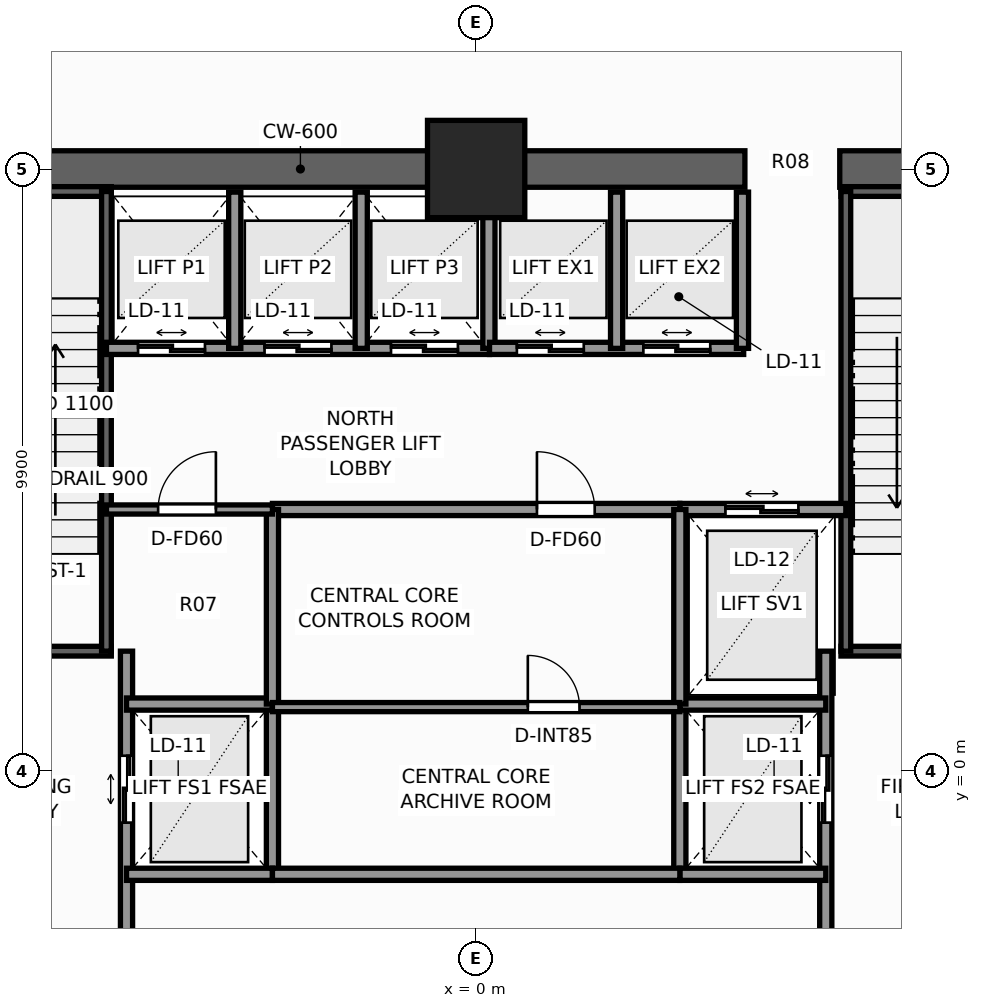
"""IFC4 building model, lengths in metres.
Left out: names, types, materials, properties, quantities, classifications, styles, units other than length and angle.
Written with IfcOpenShell. Run it as: python <this file> out.ifc"""

import sys

from ifc_helpers import new_model, si_unit, direction, frame, frame_2d, origin, origin_2d, place, context, subcontext, project, spatial, rectangle, extrude, element, fill, save


model = new_model("IFC4")
c1 = context("Model", 3, precision=1e-05, world=origin(), true_north=direction((0.0, 1.0)))
c2 = subcontext(c1, "Body", "Model", "MODEL_VIEW")
j1 = project(units=[si_unit("LENGTHUNIT", "METRE"), si_unit("PLANEANGLEUNIT", "RADIAN")], contexts=[c1])
p1 = place(None, origin())
s1 = spatial("IfcSite", under=j1, at=p1, CompositionType="ELEMENT")
p2 = place(p1, origin())
s2 = spatial("IfcBuilding", under=s1, at=p2, CompositionType="ELEMENT")
p3 = place(p2, origin())
s3 = spatial("IfcBuildingStorey", under=s2, at=p3, CompositionType="ELEMENT", Elevation=0.0)
p4 = place(p3, frame((-10.2, 9.9, 0.0), z_axis=(0.0, 0.0, 1.0), x_axis=(1.0, 0.0, 0.0)))
e1 = element("IfcWall", 1, at=p4, inside=s3, PredefinedType="SHEAR", context=c2, shape_type="SweptSolid", body=[
    extrude(rectangle(XDim=14.62, YDim=0.6, at=frame_2d((7.31, 0.0))), origin(), (0.0, 0.0, 1.0), 5.5),
])
p5 = place(p3, frame((5.98, 9.9, 0.0), z_axis=(0.0, 0.0, 1.0), x_axis=(1.0, 0.0, 0.0)))
e2 = element("IfcWall", 2, at=p5, inside=s3, PredefinedType="SHEAR", context=c2, shape_type="SweptSolid", body=[
    extrude(rectangle(XDim=4.22, YDim=0.6, at=frame_2d((2.11, 0.0))), origin(), (0.0, 0.0, 1.0), 5.5),
])
p6 = place(p3, frame((0.0, 9.9, 0.0), z_axis=(0.0, 0.0, 1.0), x_axis=(1.0, 0.0, 0.0)))
e3 = element("IfcColumn", 3, at=p6, inside=s3, PredefinedType="COLUMN", context=c2, shape_type="SweptSolid", body=[
    extrude(rectangle(XDim=1.6, YDim=1.6, at=origin_2d()), origin(), (0.0, 0.0, 1.0), 5.5),
])
p7 = place(p3, frame((-9.52, 1.97, 0.0), z_axis=(0.0, 0.0, 1.0), x_axis=(1.0, 0.0, 0.0)))
e4 = element("IfcWall", 4, at=p7, inside=s3, PredefinedType="SHEAR", context=c2, shape_type="SweptSolid", body=[
    extrude(rectangle(XDim=3.52, YDim=0.16, at=frame_2d((1.76, 0.0))), origin(), (0.0, 0.0, 1.0), 5.5),
])
p8 = place(p7, frame((1.15, 0.0, 0.0)))
e5 = element("IfcOpeningElement", 5, at=p8, cuts=e4, PredefinedType="OPENING", context=c2, shape_type="SweptSolid", body=[
    extrude(rectangle(XDim=1.1, YDim=2.2, at=frame_2d((0.55, 1.1))), frame((0.0, 0.09, 0.0), z_axis=(0.0, -1.0, 0.0), x_axis=(1.0, 0.0, 0.0)), (0.0, 0.0, 1.0), 0.18),
])
p9 = place(p3, frame((-9.52, 9.53, 0.0), z_axis=(0.0, 0.0, 1.0), x_axis=(1.0, 0.0, 0.0)))
e6 = element("IfcWall", 6, at=p9, inside=s3, PredefinedType="SHEAR", context=c2, shape_type="SweptSolid", body=[
    extrude(rectangle(XDim=3.52, YDim=0.16, at=frame_2d((1.76, 0.0))), origin(), (0.0, 0.0, 1.0), 5.5),
])
p10 = place(p3, frame((-6.08, 1.97, 0.0), z_axis=(0.0, 0.0, 1.0), x_axis=(0.0, 1.0, 0.0)))
e7 = element("IfcWall", 7, at=p10, inside=s3, PredefinedType="SHEAR", context=c2, shape_type="SweptSolid", body=[
    extrude(rectangle(XDim=7.56, YDim=0.16, at=frame_2d((3.78, 0.0))), origin(), (0.0, 0.0, 1.0), 5.5),
])
p11 = place(p3, frame((6.0, 1.97, 0.0), z_axis=(0.0, 0.0, 1.0), x_axis=(1.0, 0.0, 0.0)))
e8 = element("IfcWall", 8, at=p11, inside=s3, PredefinedType="SHEAR", context=c2, shape_type="SweptSolid", body=[
    extrude(rectangle(XDim=3.52, YDim=0.16, at=frame_2d((1.76, 0.0))), origin(), (0.0, 0.0, 1.0), 5.5),
])
p12 = place(p11, frame((1.15, 0.0, 0.0)))
e9 = element("IfcOpeningElement", 9, at=p12, cuts=e8, PredefinedType="OPENING", context=c2, shape_type="SweptSolid", body=[
    extrude(rectangle(XDim=1.1, YDim=2.2, at=frame_2d((0.55, 1.1))), frame((0.0, 0.09, 0.0), z_axis=(0.0, -1.0, 0.0), x_axis=(1.0, 0.0, 0.0)), (0.0, 0.0, 1.0), 0.18),
])
p13 = place(p3, frame((6.0, 9.53, 0.0), z_axis=(0.0, 0.0, 1.0), x_axis=(1.0, 0.0, 0.0)))
e10 = element("IfcWall", 10, at=p13, inside=s3, PredefinedType="SHEAR", context=c2, shape_type="SweptSolid", body=[
    extrude(rectangle(XDim=3.52, YDim=0.16, at=frame_2d((1.76, 0.0))), origin(), (0.0, 0.0, 1.0), 5.5),
])
p14 = place(p3, frame((6.08, 1.97, 0.0), z_axis=(0.0, 0.0, 1.0), x_axis=(0.0, 1.0, 0.0)))
e11 = element("IfcWall", 11, at=p14, inside=s3, PredefinedType="SHEAR", context=c2, shape_type="SweptSolid", body=[
    extrude(rectangle(XDim=7.56, YDim=0.16, at=frame_2d((3.78, 0.0))), origin(), (0.0, 0.0, 1.0), 5.5),
])
p15 = place(p3, frame((-5.75, -3.6, 0.0), z_axis=(0.0, 0.0, 1.0), x_axis=(0.0, 1.0, 0.0)))
e12 = element("IfcWall", 12, at=p15, inside=s3, PredefinedType="SOLIDWALL", context=c2, shape_type="SweptSolid", body=[
    extrude(rectangle(XDim=5.57, YDim=0.2, at=frame_2d((2.785, 0.0))), origin(), (0.0, 0.0, 1.0), 5.22),
])
p16 = place(p15, frame((2.75, 0.0, 0.0)))
e13 = element("IfcOpeningElement", 13, at=p16, cuts=e12, PredefinedType="OPENING", context=c2, shape_type="SweptSolid", body=[
    extrude(rectangle(XDim=1.1, YDim=2.2, at=frame_2d((0.55, 1.1))), frame((0.0, 0.11, 0.0), z_axis=(0.0, -1.0, 0.0), x_axis=(1.0, 0.0, 0.0)), (0.0, 0.0, 1.0), 0.22),
])
p17 = place(p3, frame((-3.35, -1.7, 0.0), z_axis=(0.0, 0.0, 1.0), x_axis=(0.0, 1.0, 0.0)))
e14 = element("IfcWall", 14, at=p17, inside=s3, PredefinedType="SOLIDWALL", context=c2, shape_type="SweptSolid", body=[
    extrude(rectangle(XDim=2.8, YDim=0.2, at=frame_2d((1.4, 0.0))), origin(), (0.0, 0.0, 1.0), 5.22),
])
for number, where, z_axis, x_axis in (
    (15, (-5.75, -1.7, 0.0), (0.0, 0.0, 1.0), (1.0, 0.0, 0.0)),
    (16, (-5.75, 1.1, 0.0), (0.0, 0.0, 1.0), (1.0, 0.0, 0.0)),
):
    element("IfcWall", number, at=place(p3, frame(where, z_axis=z_axis, x_axis=x_axis)), inside=s3, PredefinedType="SOLIDWALL", context=c2, shape_type="SweptSolid", body=[
        extrude(rectangle(XDim=2.4, YDim=0.2, at=frame_2d((1.2, 0.0))), origin(), (0.0, 0.0, 1.0), 5.22),
    ])
p18 = place(p3, frame((5.75, -3.6, 0.0), z_axis=(0.0, 0.0, 1.0), x_axis=(0.0, 1.0, 0.0)))
e17 = element("IfcWall", 17, at=p18, inside=s3, PredefinedType="SOLIDWALL", context=c2, shape_type="SweptSolid", body=[
    extrude(rectangle(XDim=5.57, YDim=0.2, at=frame_2d((2.785, 0.0))), origin(), (0.0, 0.0, 1.0), 5.22),
])
p19 = place(p18, frame((2.75, 0.0, 0.0)))
e18 = element("IfcOpeningElement", 18, at=p19, cuts=e17, PredefinedType="OPENING", context=c2, shape_type="SweptSolid", body=[
    extrude(rectangle(XDim=1.1, YDim=2.2, at=frame_2d((0.55, 1.1))), frame((0.0, 0.11, 0.0), z_axis=(0.0, -1.0, 0.0), x_axis=(1.0, 0.0, 0.0)), (0.0, 0.0, 1.0), 0.22),
])
p20 = place(p3, frame((3.35, -1.7, 0.0), z_axis=(0.0, 0.0, 1.0), x_axis=(0.0, 1.0, 0.0)))
e19 = element("IfcWall", 19, at=p20, inside=s3, PredefinedType="SOLIDWALL", context=c2, shape_type="SweptSolid", body=[
    extrude(rectangle(XDim=2.8, YDim=0.2, at=frame_2d((1.4, 0.0))), origin(), (0.0, 0.0, 1.0), 5.22),
])
for number, where, z_axis, x_axis in (
    (20, (3.35, -1.7, 0.0), (0.0, 0.0, 1.0), (1.0, 0.0, 0.0)),
    (21, (3.35, 1.1, 0.0), (0.0, 0.0, 1.0), (1.0, 0.0, 0.0)),
):
    element("IfcWall", number, at=place(p3, frame(where, z_axis=z_axis, x_axis=x_axis)), inside=s3, PredefinedType="SOLIDWALL", context=c2, shape_type="SweptSolid", body=[
        extrude(rectangle(XDim=2.4, YDim=0.2, at=frame_2d((1.2, 0.0))), origin(), (0.0, 0.0, 1.0), 5.22),
    ])
p21 = place(p3, frame((3.35, 4.3, 0.0), z_axis=(0.0, 0.0, 1.0), x_axis=(1.0, 0.0, 0.0)))
e22 = element("IfcWall", 22, at=p21, inside=s3, PredefinedType="SOLIDWALL", context=c2, shape_type="SweptSolid", body=[
    extrude(rectangle(XDim=2.73, YDim=0.2, at=frame_2d((1.365, 0.0))), origin(), (0.0, 0.0, 1.0), 5.22),
])
p22 = place(p21, frame((0.75, 0.0, 0.0)))
e23 = element("IfcOpeningElement", 23, at=p22, cuts=e22, PredefinedType="OPENING", context=c2, shape_type="SweptSolid", body=[
    extrude(rectangle(XDim=1.2, YDim=2.25, at=frame_2d((0.6, 1.125))), frame((0.0, 0.11, 0.0), z_axis=(0.0, -1.0, 0.0), x_axis=(1.0, 0.0, 0.0)), (0.0, 0.0, 1.0), 0.22),
])
p23 = place(p3, frame((-6.08, 6.95, 0.0), z_axis=(0.0, 0.0, 1.0), x_axis=(1.0, 0.0, 0.0)))
e24 = element("IfcWall", 24, at=p23, inside=s3, PredefinedType="SOLIDWALL", context=c2, shape_type="SweptSolid", body=[
    extrude(rectangle(XDim=6.3, YDim=0.2, at=frame_2d((3.15, 0.0))), origin(), (0.0, 0.0, 1.0), 5.22),
])
p24 = place(p23, frame((0.52, 0.0, 0.0)))
e25 = element("IfcOpeningElement", 25, at=p24, cuts=e24, PredefinedType="OPENING", context=c2, shape_type="SweptSolid", body=[
    extrude(rectangle(XDim=1.1, YDim=2.2, at=frame_2d((0.55, 1.1))), frame((0.0, 0.11, 0.0), z_axis=(0.0, -1.0, 0.0), x_axis=(1.0, 0.0, 0.0)), (0.0, 0.0, 1.0), 0.22),
])
p25 = place(p23, frame((2.6, 0.0, 0.0)))
e26 = element("IfcOpeningElement", 26, at=p25, cuts=e24, PredefinedType="OPENING", context=c2, shape_type="SweptSolid", body=[
    extrude(rectangle(XDim=1.1, YDim=2.2, at=frame_2d((0.55, 1.1))), frame((0.0, 0.11, 0.0), z_axis=(0.0, -1.0, 0.0), x_axis=(1.0, 0.0, 0.0)), (0.0, 0.0, 1.0), 0.22),
])
p26 = place(p23, frame((4.68, 0.0, 0.0)))
e27 = element("IfcOpeningElement", 27, at=p26, cuts=e24, PredefinedType="OPENING", context=c2, shape_type="SweptSolid", body=[
    extrude(rectangle(XDim=1.1, YDim=2.2, at=frame_2d((0.55, 1.1))), frame((0.0, 0.11, 0.0), z_axis=(0.0, -1.0, 0.0), x_axis=(1.0, 0.0, 0.0)), (0.0, 0.0, 1.0), 0.22),
])
for number, where, z_axis, x_axis in (
    (28, (-3.97, 6.95, 0.0), (0.0, 0.0, 1.0), (0.0, 1.0, 0.0)),
    (29, (-1.89, 6.95, 0.0), (0.0, 0.0, 1.0), (0.0, 1.0, 0.0)),
    (30, (0.21, 6.95, 0.0), (0.0, 0.0, 1.0), (0.0, 1.0, 0.0)),
):
    element("IfcWall", number, at=place(p3, frame(where, z_axis=z_axis, x_axis=x_axis)), inside=s3, PredefinedType="SOLIDWALL", context=c2, shape_type="SweptSolid", body=[
        extrude(rectangle(XDim=2.57, YDim=0.2, at=frame_2d((1.285, 0.0))), origin(), (0.0, 0.0, 1.0), 5.22),
    ])
p27 = place(p3, frame((0.22, 6.95, 0.0), z_axis=(0.0, 0.0, 1.0), x_axis=(1.0, 0.0, 0.0)))
e31 = element("IfcWall", 31, at=p27, inside=s3, PredefinedType="SOLIDWALL", context=c2, shape_type="SweptSolid", body=[
    extrude(rectangle(XDim=4.18, YDim=0.2, at=frame_2d((2.09, 0.0))), origin(), (0.0, 0.0, 1.0), 5.22),
])
p28 = place(p27, frame((0.45, 0.0, 0.0)))
e32 = element("IfcOpeningElement", 32, at=p28, cuts=e31, PredefinedType="OPENING", context=c2, shape_type="SweptSolid", body=[
    extrude(rectangle(XDim=1.1, YDim=2.2, at=frame_2d((0.55, 1.1))), frame((0.0, 0.11, 0.0), z_axis=(0.0, -1.0, 0.0), x_axis=(1.0, 0.0, 0.0)), (0.0, 0.0, 1.0), 0.22),
])
p29 = place(p27, frame((2.53, 0.0, 0.0)))
e33 = element("IfcOpeningElement", 33, at=p29, cuts=e31, PredefinedType="OPENING", context=c2, shape_type="SweptSolid", body=[
    extrude(rectangle(XDim=1.1, YDim=2.2, at=frame_2d((0.55, 1.1))), frame((0.0, 0.11, 0.0), z_axis=(0.0, -1.0, 0.0), x_axis=(1.0, 0.0, 0.0)), (0.0, 0.0, 1.0), 0.22),
])
for number, where, z_axis, x_axis in (
    (34, (4.38, 6.95, 0.0), (0.0, 0.0, 1.0), (0.0, 1.0, 0.0)),
    (35, (2.31, 6.95, 0.0), (0.0, 0.0, 1.0), (0.0, 1.0, 0.0)),
):
    element("IfcWall", number, at=place(p3, frame(where, z_axis=z_axis, x_axis=x_axis)), inside=s3, PredefinedType="SOLIDWALL", context=c2, shape_type="SweptSolid", body=[
        extrude(rectangle(XDim=2.57, YDim=0.2, at=frame_2d((1.285, 0.0))), origin(), (0.0, 0.0, 1.0), 5.22),
    ])
p30 = place(p3, frame((-3.35, 4.3, 0.0), z_axis=(0.0, 0.0, 1.0), x_axis=(1.0, 0.0, 0.0)))
e36 = element("IfcWall", 36, at=p30, inside=s3, PredefinedType="SOLIDWALL", context=c2, shape_type="SweptSolid", body=[
    extrude(rectangle(XDim=6.7, YDim=0.2, at=frame_2d((3.35, 0.0))), origin(), (0.0, 0.0, 1.0), 5.22),
])
p31 = place(p30, frame((4.35, 0.0, 0.0)))
e37 = element("IfcOpeningElement", 37, at=p31, cuts=e36, PredefinedType="OPENING", context=c2, shape_type="SweptSolid", body=[
    extrude(rectangle(XDim=0.95, YDim=2.06, at=frame_2d((0.475, 1.03))), frame((0.0, 0.11, 0.0), z_axis=(0.0, -1.0, 0.0), x_axis=(1.0, 0.0, 0.0)), (0.0, 0.0, 1.0), 0.22),
])
p32 = place(p3, frame((-3.35, -1.7, 0.0), z_axis=(0.0, 0.0, 1.0), x_axis=(1.0, 0.0, 0.0)))
e38 = element("IfcWall", 38, at=p32, inside=s3, PredefinedType="SOLIDWALL", context=c2, shape_type="SweptSolid", body=[
    extrude(rectangle(XDim=6.7, YDim=0.2, at=frame_2d((3.35, 0.0))), origin(), (0.0, 0.0, 1.0), 5.22),
])
for number, where, z_axis, x_axis in (
    (39, (-3.35, 1.1, 0.0), (0.0, 0.0, 1.0), (0.0, 1.0, 0.0)),
    (40, (3.35, 1.1, 0.0), (0.0, 0.0, 1.0), (0.0, 1.0, 0.0)),
):
    element("IfcWall", number, at=place(p3, frame(where, z_axis=z_axis, x_axis=x_axis)), inside=s3, PredefinedType="SOLIDWALL", context=c2, shape_type="SweptSolid", body=[
        extrude(rectangle(XDim=3.2, YDim=0.2, at=frame_2d((1.6, 0.0))), origin(), (0.0, 0.0, 1.0), 5.22),
    ])
p33 = place(p3, frame((-3.35, 1.05, 0.0), z_axis=(0.0, 0.0, 1.0), x_axis=(1.0, 0.0, 0.0)))
e41 = element("IfcWall", 41, at=p33, inside=s3, PredefinedType="PARTITIONING", context=c2, shape_type="SweptSolid", body=[
    extrude(rectangle(XDim=6.7, YDim=0.15, at=frame_2d((3.35, 0.0))), origin(), (0.0, 0.0, 1.0), 5.22),
])
p34 = place(p33, frame((4.2, 0.0, 0.0)))
e42 = element("IfcOpeningElement", 42, at=p34, cuts=e41, PredefinedType="OPENING", context=c2, shape_type="SweptSolid", body=[
    extrude(rectangle(XDim=0.85, YDim=2.03, at=frame_2d((0.425, 1.015))), frame((0.0, 0.085, 0.0), z_axis=(0.0, -1.0, 0.0), x_axis=(1.0, 0.0, 0.0)), (0.0, 0.0, 1.0), 0.17),
])
p35 = place(p3, frame((-6.08, 4.3, 0.0), z_axis=(0.0, 0.0, 1.0), x_axis=(1.0, 0.0, 0.0)))
e43 = element("IfcWall", 43, at=p35, inside=s3, PredefinedType="PARTITIONING", context=c2, shape_type="SweptSolid", body=[
    extrude(rectangle(XDim=2.73, YDim=0.15, at=frame_2d((1.365, 0.0))), origin(), (0.0, 0.0, 1.0), 5.22),
])
p36 = place(p35, frame((0.85, 0.0, 0.0)))
e44 = element("IfcOpeningElement", 44, at=p36, cuts=e43, PredefinedType="OPENING", context=c2, shape_type="SweptSolid", body=[
    extrude(rectangle(XDim=0.95, YDim=2.06, at=frame_2d((0.475, 1.03))), frame((0.0, 0.085, 0.0), z_axis=(0.0, -1.0, 0.0), x_axis=(1.0, 0.0, 0.0)), (0.0, 0.0, 1.0), 0.17),
])
p37 = place(p16, origin())
e45 = element("IfcDoor", 45, at=p37, inside=s3, OperationType="DOUBLE_DOOR_SLIDING", PredefinedType="DOOR", context=c2, shape_type="SweptSolid", body=[
    extrude(rectangle(XDim=1.1, YDim=2.2, at=frame_2d((0.55, 1.1))), frame((0.0, 0.025, 0.0), z_axis=(0.0, -1.0, 0.0), x_axis=(1.0, 0.0, 0.0)), (0.0, 0.0, 1.0), 0.05),
])
fill(e13, e45)
p38 = place(p19, origin())
e46 = element("IfcDoor", 46, at=p38, inside=s3, OperationType="DOUBLE_DOOR_SLIDING", PredefinedType="DOOR", context=c2, shape_type="SweptSolid", body=[
    extrude(rectangle(XDim=1.1, YDim=2.2, at=frame_2d((0.55, 1.1))), frame((0.0, 0.025, 0.0), z_axis=(0.0, -1.0, 0.0), x_axis=(1.0, 0.0, 0.0)), (0.0, 0.0, 1.0), 0.05),
])
fill(e18, e46)
p39 = place(p22, origin())
e47 = element("IfcDoor", 47, at=p39, inside=s3, OperationType="DOUBLE_DOOR_SLIDING", PredefinedType="DOOR", context=c2, shape_type="SweptSolid", body=[
    extrude(rectangle(XDim=1.2, YDim=2.25, at=frame_2d((0.6, 1.125))), frame((0.0, 0.025, 0.0), z_axis=(0.0, -1.0, 0.0), x_axis=(1.0, 0.0, 0.0)), (0.0, 0.0, 1.0), 0.05),
])
fill(e23, e47)
p40 = place(p24, origin())
e48 = element("IfcDoor", 48, at=p40, inside=s3, OperationType="DOUBLE_DOOR_SLIDING", PredefinedType="DOOR", context=c2, shape_type="SweptSolid", body=[
    extrude(rectangle(XDim=1.1, YDim=2.2, at=frame_2d((0.55, 1.1))), frame((0.0, 0.025, 0.0), z_axis=(0.0, -1.0, 0.0), x_axis=(1.0, 0.0, 0.0)), (0.0, 0.0, 1.0), 0.05),
])
fill(e25, e48)
p41 = place(p25, origin())
e49 = element("IfcDoor", 49, at=p41, inside=s3, OperationType="DOUBLE_DOOR_SLIDING", PredefinedType="DOOR", context=c2, shape_type="SweptSolid", body=[
    extrude(rectangle(XDim=1.1, YDim=2.2, at=frame_2d((0.55, 1.1))), frame((0.0, 0.025, 0.0), z_axis=(0.0, -1.0, 0.0), x_axis=(1.0, 0.0, 0.0)), (0.0, 0.0, 1.0), 0.05),
])
fill(e26, e49)
p42 = place(p26, origin())
e50 = element("IfcDoor", 50, at=p42, inside=s3, OperationType="DOUBLE_DOOR_SLIDING", PredefinedType="DOOR", context=c2, shape_type="SweptSolid", body=[
    extrude(rectangle(XDim=1.1, YDim=2.2, at=frame_2d((0.55, 1.1))), frame((0.0, 0.025, 0.0), z_axis=(0.0, -1.0, 0.0), x_axis=(1.0, 0.0, 0.0)), (0.0, 0.0, 1.0), 0.05),
])
fill(e27, e50)
p43 = place(p28, origin())
e51 = element("IfcDoor", 51, at=p43, inside=s3, OperationType="DOUBLE_DOOR_SLIDING", PredefinedType="DOOR", context=c2, shape_type="SweptSolid", body=[
    extrude(rectangle(XDim=1.1, YDim=2.2, at=frame_2d((0.55, 1.1))), frame((0.0, 0.025, 0.0), z_axis=(0.0, -1.0, 0.0), x_axis=(1.0, 0.0, 0.0)), (0.0, 0.0, 1.0), 0.05),
])
fill(e32, e51)
p44 = place(p29, origin())
e52 = element("IfcDoor", 52, at=p44, inside=s3, OperationType="DOUBLE_DOOR_SLIDING", PredefinedType="DOOR", context=c2, shape_type="SweptSolid", body=[
    extrude(rectangle(XDim=1.1, YDim=2.2, at=frame_2d((0.55, 1.1))), frame((0.0, 0.025, 0.0), z_axis=(0.0, -1.0, 0.0), x_axis=(1.0, 0.0, 0.0)), (0.0, 0.0, 1.0), 0.05),
])
fill(e33, e52)
p45 = place(p31, origin())
e53 = element("IfcDoor", 53, at=p45, inside=s3, OperationType="SINGLE_SWING_LEFT", PredefinedType="DOOR", context=c2, shape_type="SweptSolid", body=[
    extrude(rectangle(XDim=0.95, YDim=2.06, at=frame_2d((0.475, 1.03))), frame((0.0, 0.025, 0.0), z_axis=(0.0, -1.0, 0.0), x_axis=(1.0, 0.0, 0.0)), (0.0, 0.0, 1.0), 0.05),
])
fill(e37, e53)
p46 = place(p34, origin())
e54 = element("IfcDoor", 54, at=p46, inside=s3, OperationType="SINGLE_SWING_LEFT", PredefinedType="DOOR", context=c2, shape_type="SweptSolid", body=[
    extrude(rectangle(XDim=0.85, YDim=2.03, at=frame_2d((0.425, 1.015))), frame((0.0, 0.025, 0.0), z_axis=(0.0, -1.0, 0.0), x_axis=(1.0, 0.0, 0.0)), (0.0, 0.0, 1.0), 0.05),
])
fill(e42, e54)
p47 = place(p36, origin())
e55 = element("IfcDoor", 55, at=p47, inside=s3, OperationType="SINGLE_SWING_RIGHT", PredefinedType="DOOR", context=c2, shape_type="SweptSolid", body=[
    extrude(rectangle(XDim=0.95, YDim=2.06, at=frame_2d((0.475, 1.03))), frame((0.0, 0.025, 0.0), z_axis=(0.0, -1.0, 0.0), x_axis=(1.0, 0.0, 0.0)), (0.0, 0.0, 1.0), 0.05),
])
fill(e44, e55)
save(model, sys.argv[1])
